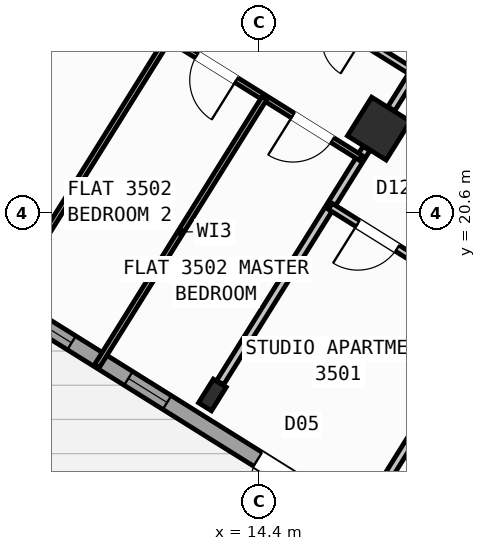
"""IFC4 building model, lengths in metres.
Left out: names, types, materials, properties, quantities, classifications, styles, units other than length and angle.
Written with IfcOpenShell. Run it as: python <this file> out.ifc"""

import sys

from ifc_helpers import new_model, si_unit, direction, frame, frame_2d, origin, origin_2d, place, context, subcontext, project, spatial, rectangle, hollow_rectangle, i_section, extrude, source, transform, mapped, element, fill, save


model = new_model("IFC4")
c1 = context("Model", 3, precision=1e-05, world=origin(), true_north=direction((0.0, 1.0)))
c2 = subcontext(c1, "Body", "Model", "MODEL_VIEW")
j1 = project(units=[si_unit("LENGTHUNIT", "METRE"), si_unit("PLANEANGLEUNIT", "RADIAN")], contexts=[c1])
p1 = place(None, origin())
s1 = spatial("IfcSite", under=j1, at=p1, CompositionType="ELEMENT")
p2 = place(p1, origin())
s2 = spatial("IfcBuilding", under=s1, at=p2, CompositionType="ELEMENT")
p3 = place(p2, frame((0.0, 0.0, 140.7)))
s3 = spatial("IfcBuildingStorey", under=s2, at=p3, CompositionType="ELEMENT", Elevation=140.7)
m1 = source(origin(), c2, "Body", "SweptSolid", [
    extrude(hollow_rectangle(XDim=0.9, YDim=0.9, WallThickness=0.036, at=origin_2d()), origin(), (0.0, 0.0, 1.0), 3.6),
])
p4 = place(p3, frame((16.764, 22.261, 0.0), z_axis=(0.0, 0.0, 1.0), x_axis=(-0.848048096156, 0.529919264233, 0.0)))
e1 = element("IfcColumn", 1, at=p4, inside=s3, PredefinedType="COLUMN", context=c2, shape_type="MappedRepresentation", body=[
    mapped(m1, transform((0.0, 0.0, 0.0), scale=1.0)),
])
m2 = source(origin(), c2, "Body", "SweptSolid", [
    extrude(i_section(OverallWidth=0.3, OverallDepth=0.55, WebThickness=0.015, FlangeThickness=0.029, at=origin_2d()), origin(), (0.0, 0.0, 1.0), 3.6),
])
p5 = place(p3, frame((13.478, 17.003, 0.0), z_axis=(0.0, 0.0, 1.0), x_axis=(-0.848048096156, 0.529919264233, 0.0)))
e2 = element("IfcColumn", 2, at=p5, inside=s3, PredefinedType="COLUMN", context=c2, shape_type="MappedRepresentation", body=[
    mapped(m2, transform((0.0, 0.0, 0.0), scale=1.0)),
])
p6 = place(p3, frame((29.268, 6.429, 0.0), z_axis=(0.0, 0.0, 1.0), x_axis=(-0.848049971435, 0.529916263149, 0.0)))
e3 = element("IfcWall", 3, at=p6, inside=s3, PredefinedType="STANDARD", context=c2, shape_type="SweptSolid", body=[
    extrude(rectangle(XDim=31.588, YDim=0.32, at=frame_2d((15.794, 0.0))), origin(), (0.0, 0.0, 1.0), 3.35),
])
p7 = place(p6, frame((16.362, 0.0, 0.0)))
e4 = element("IfcOpeningElement", 4, at=p7, cuts=e3, PredefinedType="OPENING", context=c2, shape_type="SweptSolid", body=[
    extrude(rectangle(XDim=1.2, YDim=2.15, at=frame_2d((0.6, 1.075))), frame((0.0, 0.17, 0.0), z_axis=(0.0, -1.0, 0.0), x_axis=(1.0, 0.0, 0.0)), (0.0, 0.0, 1.0), 0.34),
])
p8 = place(p6, frame((2.989, 0.0, 0.8)))
e5 = element("IfcOpeningElement", 5, at=p8, cuts=e3, PredefinedType="OPENING", context=c2, shape_type="SweptSolid", body=[
    extrude(rectangle(XDim=2.1, YDim=1.55, at=frame_2d((1.05, 0.775))), frame((0.0, 0.17, 0.0), z_axis=(0.0, -1.0, 0.0), x_axis=(1.0, 0.0, 0.0)), (0.0, 0.0, 1.0), 0.34),
])
p9 = place(p6, frame((8.359, 0.0, 0.8)))
e6 = element("IfcOpeningElement", 6, at=p9, cuts=e3, PredefinedType="OPENING", context=c2, shape_type="SweptSolid", body=[
    extrude(rectangle(XDim=2.1, YDim=1.55, at=frame_2d((1.05, 0.775))), frame((0.0, 0.17, 0.0), z_axis=(0.0, -1.0, 0.0), x_axis=(1.0, 0.0, 0.0)), (0.0, 0.0, 1.0), 0.34),
])
p10 = place(p6, frame((13.284, 0.0, 0.95)))
e7 = element("IfcOpeningElement", 7, at=p10, cuts=e3, PredefinedType="OPENING", context=c2, shape_type="SweptSolid", body=[
    extrude(rectangle(XDim=1.2, YDim=1.4, at=frame_2d((0.6, 0.7))), frame((0.0, 0.17, 0.0), z_axis=(0.0, -1.0, 0.0), x_axis=(1.0, 0.0, 0.0)), (0.0, 0.0, 1.0), 0.34),
])
p11 = place(p6, frame((29.188, 0.0, 0.95)))
e8 = element("IfcOpeningElement", 8, at=p11, cuts=e3, PredefinedType="OPENING", context=c2, shape_type="SweptSolid", body=[
    extrude(rectangle(XDim=1.2, YDim=1.4, at=frame_2d((0.6, 0.7))), frame((0.0, 0.17, 0.0), z_axis=(0.0, -1.0, 0.0), x_axis=(1.0, 0.0, 0.0)), (0.0, 0.0, 1.0), 0.34),
])
p12 = place(p6, frame((19.674, 0.0, 1.0)))
e9 = element("IfcOpeningElement", 9, at=p12, cuts=e3, PredefinedType="OPENING", context=c2, shape_type="SweptSolid", body=[
    extrude(rectangle(XDim=0.9, YDim=1.25, at=frame_2d((0.45, 0.625))), frame((0.0, 0.17, 0.0), z_axis=(0.0, -1.0, 0.0), x_axis=(1.0, 0.0, 0.0)), (0.0, 0.0, 1.0), 0.34),
])
p13 = place(p6, frame((21.896, 0.0, 1.0)))
e10 = element("IfcOpeningElement", 10, at=p13, cuts=e3, PredefinedType="OPENING", context=c2, shape_type="SweptSolid", body=[
    extrude(rectangle(XDim=0.9, YDim=1.25, at=frame_2d((0.45, 0.625))), frame((0.0, 0.17, 0.0), z_axis=(0.0, -1.0, 0.0), x_axis=(1.0, 0.0, 0.0)), (0.0, 0.0, 1.0), 0.34),
])
p14 = place(p6, frame((24.106, 0.0, 1.0)))
e11 = element("IfcOpeningElement", 11, at=p14, cuts=e3, PredefinedType="OPENING", context=c2, shape_type="SweptSolid", body=[
    extrude(rectangle(XDim=0.65, YDim=1.15, at=frame_2d((0.325, 0.575))), frame((0.0, 0.17, 0.0), z_axis=(0.0, -1.0, 0.0), x_axis=(1.0, 0.0, 0.0)), (0.0, 0.0, 1.0), 0.34),
])
p15 = place(p6, frame((26.366, 0.0, 1.0)))
e12 = element("IfcOpeningElement", 12, at=p15, cuts=e3, PredefinedType="OPENING", context=c2, shape_type="SweptSolid", body=[
    extrude(rectangle(XDim=0.9, YDim=1.25, at=frame_2d((0.45, 0.625))), frame((0.0, 0.17, 0.0), z_axis=(0.0, -1.0, 0.0), x_axis=(1.0, 0.0, 0.0)), (0.0, 0.0, 1.0), 0.34),
])
p16 = place(p3, frame((2.415, 23.452, 0.0), z_axis=(0.0, 0.0, 1.0), x_axis=(0.52991049553, 0.848053575387, 0.0)))
e13 = element("IfcWall", 13, at=p16, inside=s3, PredefinedType="STANDARD", context=c2, shape_type="SweptSolid", body=[
    extrude(rectangle(XDim=21.587, YDim=0.32, at=frame_2d((10.794, 0.0))), origin(), (0.0, 0.0, 1.0), 2.775),
])
p17 = place(p16, frame((2.356, 0.0, 0.8)))
e14 = element("IfcOpeningElement", 14, at=p17, cuts=e13, PredefinedType="OPENING", context=c2, shape_type="SweptSolid", body=[
    extrude(rectangle(XDim=2.1, YDim=1.55, at=frame_2d((1.05, 0.775))), frame((0.0, 0.17, 0.0), z_axis=(0.0, -1.0, 0.0), x_axis=(1.0, 0.0, 0.0)), (0.0, 0.0, 1.0), 0.34),
])
p18 = place(p16, frame((8.639, 0.0, 1.0)))
e15 = element("IfcOpeningElement", 15, at=p18, cuts=e13, PredefinedType="OPENING", context=c2, shape_type="SweptSolid", body=[
    extrude(rectangle(XDim=0.9, YDim=1.25, at=frame_2d((0.45, 0.625))), frame((0.0, 0.17, 0.0), z_axis=(0.0, -1.0, 0.0), x_axis=(1.0, 0.0, 0.0)), (0.0, 0.0, 1.0), 0.34),
])
p19 = place(p16, frame((17.744, 0.0, 0.85)))
e16 = element("IfcOpeningElement", 16, at=p19, cuts=e13, PredefinedType="OPENING", context=c2, shape_type="SweptSolid", body=[
    extrude(rectangle(XDim=1.5, YDim=1.5, at=frame_2d((0.75, 0.75))), frame((0.0, 0.17, 0.0), z_axis=(0.0, -1.0, 0.0), x_axis=(1.0, 0.0, 0.0)), (0.0, 0.0, 1.0), 0.34),
])
p20 = place(p3, frame((21.938, 23.391, 0.0), z_axis=(0.0, 0.0, 1.0), x_axis=(-0.529924725692, -0.848044683434, 0.0)))
e17 = element("IfcWall", 17, at=p20, inside=s3, PredefinedType="PARTITIONING", context=c2, shape_type="SweptSolid", body=[
    extrude(rectangle(XDim=10.35, YDim=0.16, at=frame_2d((5.175, 0.0))), origin(), (0.0, 0.0, 1.0), 3.34),
])
p21 = place(p3, frame((21.938, 23.391, 0.0), z_axis=(0.0, 0.0, 1.0), x_axis=(-0.848045850158, 0.529922858565, 0.0)))
e18 = element("IfcWall", 18, at=p21, inside=s3, PredefinedType="PARTITIONING", context=c2, shape_type="SweptSolid", body=[
    extrude(rectangle(XDim=16.73, YDim=0.16, at=frame_2d((8.365, 0.0))), origin(), (0.0, 0.0, 1.0), 3.34),
])
p22 = place(p21, frame((2.22, 0.0, 0.0)))
e19 = element("IfcOpeningElement", 19, at=p22, cuts=e18, PredefinedType="OPENING", context=c2, shape_type="SweptSolid", body=[
    extrude(rectangle(XDim=0.86, YDim=2.05, at=frame_2d((0.43, 1.025))), frame((0.0, 0.09, 0.0), z_axis=(0.0, -1.0, 0.0), x_axis=(1.0, 0.0, 0.0)), (0.0, 0.0, 1.0), 0.18),
])
p23 = place(p21, frame((14.22, 0.0, 0.0)))
e20 = element("IfcOpeningElement", 20, at=p23, cuts=e18, PredefinedType="OPENING", context=c2, shape_type="SweptSolid", body=[
    extrude(rectangle(XDim=1.0, YDim=2.1, at=frame_2d((0.5, 1.05))), frame((0.0, 0.09, 0.0), z_axis=(0.0, -1.0, 0.0), x_axis=(1.0, 0.0, 0.0)), (0.0, 0.0, 1.0), 0.18),
])
p24 = place(p3, frame((18.724, 25.399, 0.0), z_axis=(0.0, 0.0, 1.0), x_axis=(-0.529890499457, -0.848066069705, 0.0)))
e21 = element("IfcWall", 21, at=p24, inside=s3, PredefinedType="PARTITIONING", context=c2, shape_type="SweptSolid", body=[
    extrude(rectangle(XDim=3.238, YDim=0.16, at=frame_2d((1.619, 0.0))), origin(), (0.0, 0.0, 1.0), 2.775),
])
p25 = place(p3, frame((16.519, 21.87, 0.0), z_axis=(0.0, 0.0, 1.0), x_axis=(-0.529922447305, -0.848046107144, 0.0)))
e22 = element("IfcWall", 22, at=p25, inside=s3, PredefinedType="PARTITIONING", context=c2, shape_type="SweptSolid", body=[
    extrude(rectangle(XDim=5.451, YDim=0.16, at=frame_2d((2.726, 0.0))), origin(), (0.0, 0.0, 1.0), 2.775),
])
p26 = place(p3, frame((19.019, 18.718, 0.0), z_axis=(0.0, 0.0, 1.0), x_axis=(-0.848059820872, 0.529900500304, 0.0)))
e23 = element("IfcWall", 23, at=p26, inside=s3, PredefinedType="PLUMBINGWALL", context=c2, shape_type="SweptSolid", body=[
    extrude(rectangle(XDim=3.79, YDim=0.14, at=frame_2d((1.895, 0.0))), origin(), (0.0, 0.0, 1.0), 3.34),
])
p27 = place(p26, frame((2.23, 0.0, 0.0)))
e24 = element("IfcOpeningElement", 24, at=p27, cuts=e23, PredefinedType="OPENING", context=c2, shape_type="SweptSolid", body=[
    extrude(rectangle(XDim=0.92, YDim=2.08, at=frame_2d((0.46, 1.04))), frame((0.0, 0.08, 0.0), z_axis=(0.0, -1.0, 0.0), x_axis=(1.0, 0.0, 0.0)), (0.0, 0.0, 1.0), 0.16),
])
p28 = place(p3, frame((11.143, 30.136, 0.0), z_axis=(0.0, 0.0, 1.0), x_axis=(-0.529922479612, -0.848046086956, 0.0)))
e25 = element("IfcWall", 25, at=p28, inside=s3, PredefinedType="PARTITIONING", context=c2, shape_type="SweptSolid", body=[
    extrude(rectangle(XDim=10.62, YDim=0.11, at=frame_2d((5.31, 0.0))), origin(), (0.0, 0.0, 1.0), 3.34),
])
p29 = place(p28, frame((3.0, 0.0, 0.0)))
e26 = element("IfcOpeningElement", 26, at=p29, cuts=e25, PredefinedType="OPENING", context=c2, shape_type="SweptSolid", body=[
    extrude(rectangle(XDim=0.78, YDim=2.05, at=frame_2d((0.39, 1.025))), frame((0.0, 0.065, 0.0), z_axis=(0.0, -1.0, 0.0), x_axis=(1.0, 0.0, 0.0)), (0.0, 0.0, 1.0), 0.13),
])
p30 = place(p3, frame((17.452, 23.364, 0.0), z_axis=(0.0, 0.0, 1.0), x_axis=(-0.848044326704, 0.52992529657, 0.0)))
e27 = element("IfcWall", 27, at=p30, inside=s3, PredefinedType="PLUMBINGWALL", context=c2, shape_type="SweptSolid", body=[
    extrude(rectangle(XDim=8.94, YDim=0.14, at=frame_2d((4.47, 0.0))), origin(), (0.0, 0.0, 1.0), 3.34),
])
p31 = place(p30, frame((5.087, 0.0, 0.0)))
e28 = element("IfcOpeningElement", 28, at=p31, cuts=e27, PredefinedType="OPENING", context=c2, shape_type="SweptSolid", body=[
    extrude(rectangle(XDim=0.78, YDim=2.05, at=frame_2d((0.39, 1.025))), frame((0.0, 0.08, 0.0), z_axis=(0.0, -1.0, 0.0), x_axis=(1.0, 0.0, 0.0)), (0.0, 0.0, 1.0), 0.16),
])
p32 = place(p30, frame((1.218, 0.0, 0.0)))
e29 = element("IfcOpeningElement", 29, at=p32, cuts=e27, PredefinedType="OPENING", context=c2, shape_type="SweptSolid", body=[
    extrude(rectangle(XDim=0.78, YDim=2.05, at=frame_2d((0.39, 1.025))), frame((0.0, 0.08, 0.0), z_axis=(0.0, -1.0, 0.0), x_axis=(1.0, 0.0, 0.0)), (0.0, 0.0, 1.0), 0.16),
])
p33 = place(p3, frame((16.403, 21.685, 0.0), z_axis=(0.0, 0.0, 1.0), x_axis=(-0.848044326704, 0.52992529657, 0.0)))
e30 = element("IfcWall", 30, at=p33, inside=s3, PredefinedType="PARTITIONING", context=c2, shape_type="SweptSolid", body=[
    extrude(rectangle(XDim=8.94, YDim=0.11, at=frame_2d((4.47, 0.0))), origin(), (0.0, 0.0, 1.0), 3.34),
])
p34 = place(p33, frame((0.657, 0.0, 0.0)))
e31 = element("IfcOpeningElement", 31, at=p34, cuts=e30, PredefinedType="OPENING", context=c2, shape_type="SweptSolid", body=[
    extrude(rectangle(XDim=0.92, YDim=2.08, at=frame_2d((0.46, 1.04))), frame((0.0, 0.065, 0.0), z_axis=(0.0, -1.0, 0.0), x_axis=(1.0, 0.0, 0.0)), (0.0, 0.0, 1.0), 0.13),
])
p35 = place(p33, frame((2.893, 0.0, 0.0)))
e32 = element("IfcOpeningElement", 32, at=p35, cuts=e30, PredefinedType="OPENING", context=c2, shape_type="SweptSolid", body=[
    extrude(rectangle(XDim=0.92, YDim=2.08, at=frame_2d((0.46, 1.04))), frame((0.0, 0.065, 0.0), z_axis=(0.0, -1.0, 0.0), x_axis=(1.0, 0.0, 0.0)), (0.0, 0.0, 1.0), 0.13),
])
p36 = place(p33, frame((5.008, 0.0, 0.0)))
e33 = element("IfcOpeningElement", 33, at=p36, cuts=e30, PredefinedType="OPENING", context=c2, shape_type="SweptSolid", body=[
    extrude(rectangle(XDim=0.92, YDim=2.08, at=frame_2d((0.46, 1.04))), frame((0.0, 0.065, 0.0), z_axis=(0.0, -1.0, 0.0), x_axis=(1.0, 0.0, 0.0)), (0.0, 0.0, 1.0), 0.13),
])
p37 = place(p33, frame((7.363, 0.0, 0.0)))
e34 = element("IfcOpeningElement", 34, at=p37, cuts=e30, PredefinedType="OPENING", context=c2, shape_type="SweptSolid", body=[
    extrude(rectangle(XDim=0.92, YDim=2.08, at=frame_2d((0.46, 1.04))), frame((0.0, 0.065, 0.0), z_axis=(0.0, -1.0, 0.0), x_axis=(1.0, 0.0, 0.0)), (0.0, 0.0, 1.0), 0.13),
])
for number, where, z_axis, x_axis in (
    (35, (14.508, 22.869, 0.0), (0.0, 0.0, 1.0), (-0.53, -0.848, 0.0)),
    (36, (12.613, 24.053, 0.0), (0.0, 0.0, 1.0), (-0.53, -0.848, 0.0)),
):
    element("IfcWall", number, at=place(p3, frame(where, z_axis=z_axis, x_axis=x_axis)), inside=s3, PredefinedType="PARTITIONING", context=c2, shape_type="SweptSolid", body=[
        extrude(rectangle(XDim=6.24, YDim=0.11, at=frame_2d((3.12, 0.0))), origin(), (0.0, 0.0, 1.0), 2.995),
    ])
p38 = place(p3, frame((10.717, 25.238, 0.0), z_axis=(0.0, 0.0, 1.0), x_axis=(-0.52991804857, -0.848048855786, 0.0)))
e37 = element("IfcWall", 37, at=p38, inside=s3, PredefinedType="PARTITIONING", context=c2, shape_type="SweptSolid", body=[
    extrude(rectangle(XDim=6.24, YDim=0.11, at=frame_2d((3.12, 0.0))), origin(), (0.0, 0.0, 1.0), 3.34),
])
m3 = source(origin(), c2, "Body", "SweptSolid", [
    extrude(rectangle(XDim=1.2, YDim=2.15, at=frame_2d((0.6, 1.075))), frame((0.0, 0.025, 0.0), z_axis=(0.0, -1.0, 0.0), x_axis=(1.0, 0.0, 0.0)), (0.0, 0.0, 1.0), 0.05),
])
p39 = place(p7, origin())
e38 = element("IfcDoor", 38, at=p39, inside=s3, OperationType="SINGLE_SWING_LEFT", PredefinedType="DOOR", context=c2, shape_type="MappedRepresentation", body=[
    mapped(m3, transform((0.0, 0.0, 0.0), scale=1.0)),
])
fill(e4, e38)
m4 = source(origin(), c2, "Body", "SweptSolid", [
    extrude(rectangle(XDim=0.9, YDim=1.25, at=frame_2d((0.45, 0.625))), frame((0.0, 0.03, 0.0), z_axis=(0.0, -1.0, 0.0), x_axis=(1.0, 0.0, 0.0)), (0.0, 0.0, 1.0), 0.06),
])
p40 = place(p12, origin())
e39 = element("IfcWindow", 39, at=p40, inside=s3, PartitioningType="SINGLE_PANEL", PredefinedType="WINDOW", context=c2, shape_type="MappedRepresentation", body=[
    mapped(m4, transform((0.0, 0.0, 0.0), scale=1.0)),
])
fill(e9, e39)
p41 = place(p13, origin())
e40 = element("IfcWindow", 40, at=p41, inside=s3, PartitioningType="SINGLE_PANEL", PredefinedType="WINDOW", context=c2, shape_type="MappedRepresentation", body=[
    mapped(m4, transform((0.0, 0.0, 0.0), scale=1.0)),
])
fill(e10, e40)
m5 = source(origin(), c2, "Body", "SweptSolid", [
    extrude(rectangle(XDim=0.92, YDim=2.08, at=frame_2d((0.46, 1.04))), frame((0.0, 0.025, 0.0), z_axis=(0.0, -1.0, 0.0), x_axis=(1.0, 0.0, 0.0)), (0.0, 0.0, 1.0), 0.05),
])
p42 = place(p27, origin())
e41 = element("IfcDoor", 41, at=p42, inside=s3, OperationType="SINGLE_SWING_RIGHT", PredefinedType="DOOR", context=c2, shape_type="MappedRepresentation", body=[
    mapped(m5, transform((0.0, 0.0, 0.0), scale=1.0)),
])
fill(e24, e41)
p43 = place(p34, origin())
e42 = element("IfcDoor", 42, at=p43, inside=s3, OperationType="SINGLE_SWING_RIGHT", PredefinedType="DOOR", context=c2, shape_type="MappedRepresentation", body=[
    mapped(m5, transform((0.0, 0.0, 0.0), scale=1.0)),
])
fill(e31, e42)
p44 = place(p35, origin())
e43 = element("IfcDoor", 43, at=p44, inside=s3, OperationType="SINGLE_SWING_LEFT", PredefinedType="DOOR", context=c2, shape_type="MappedRepresentation", body=[
    mapped(m5, transform((0.0, 0.0, 0.0), scale=1.0)),
])
fill(e32, e43)
save(model, sys.argv[1])
